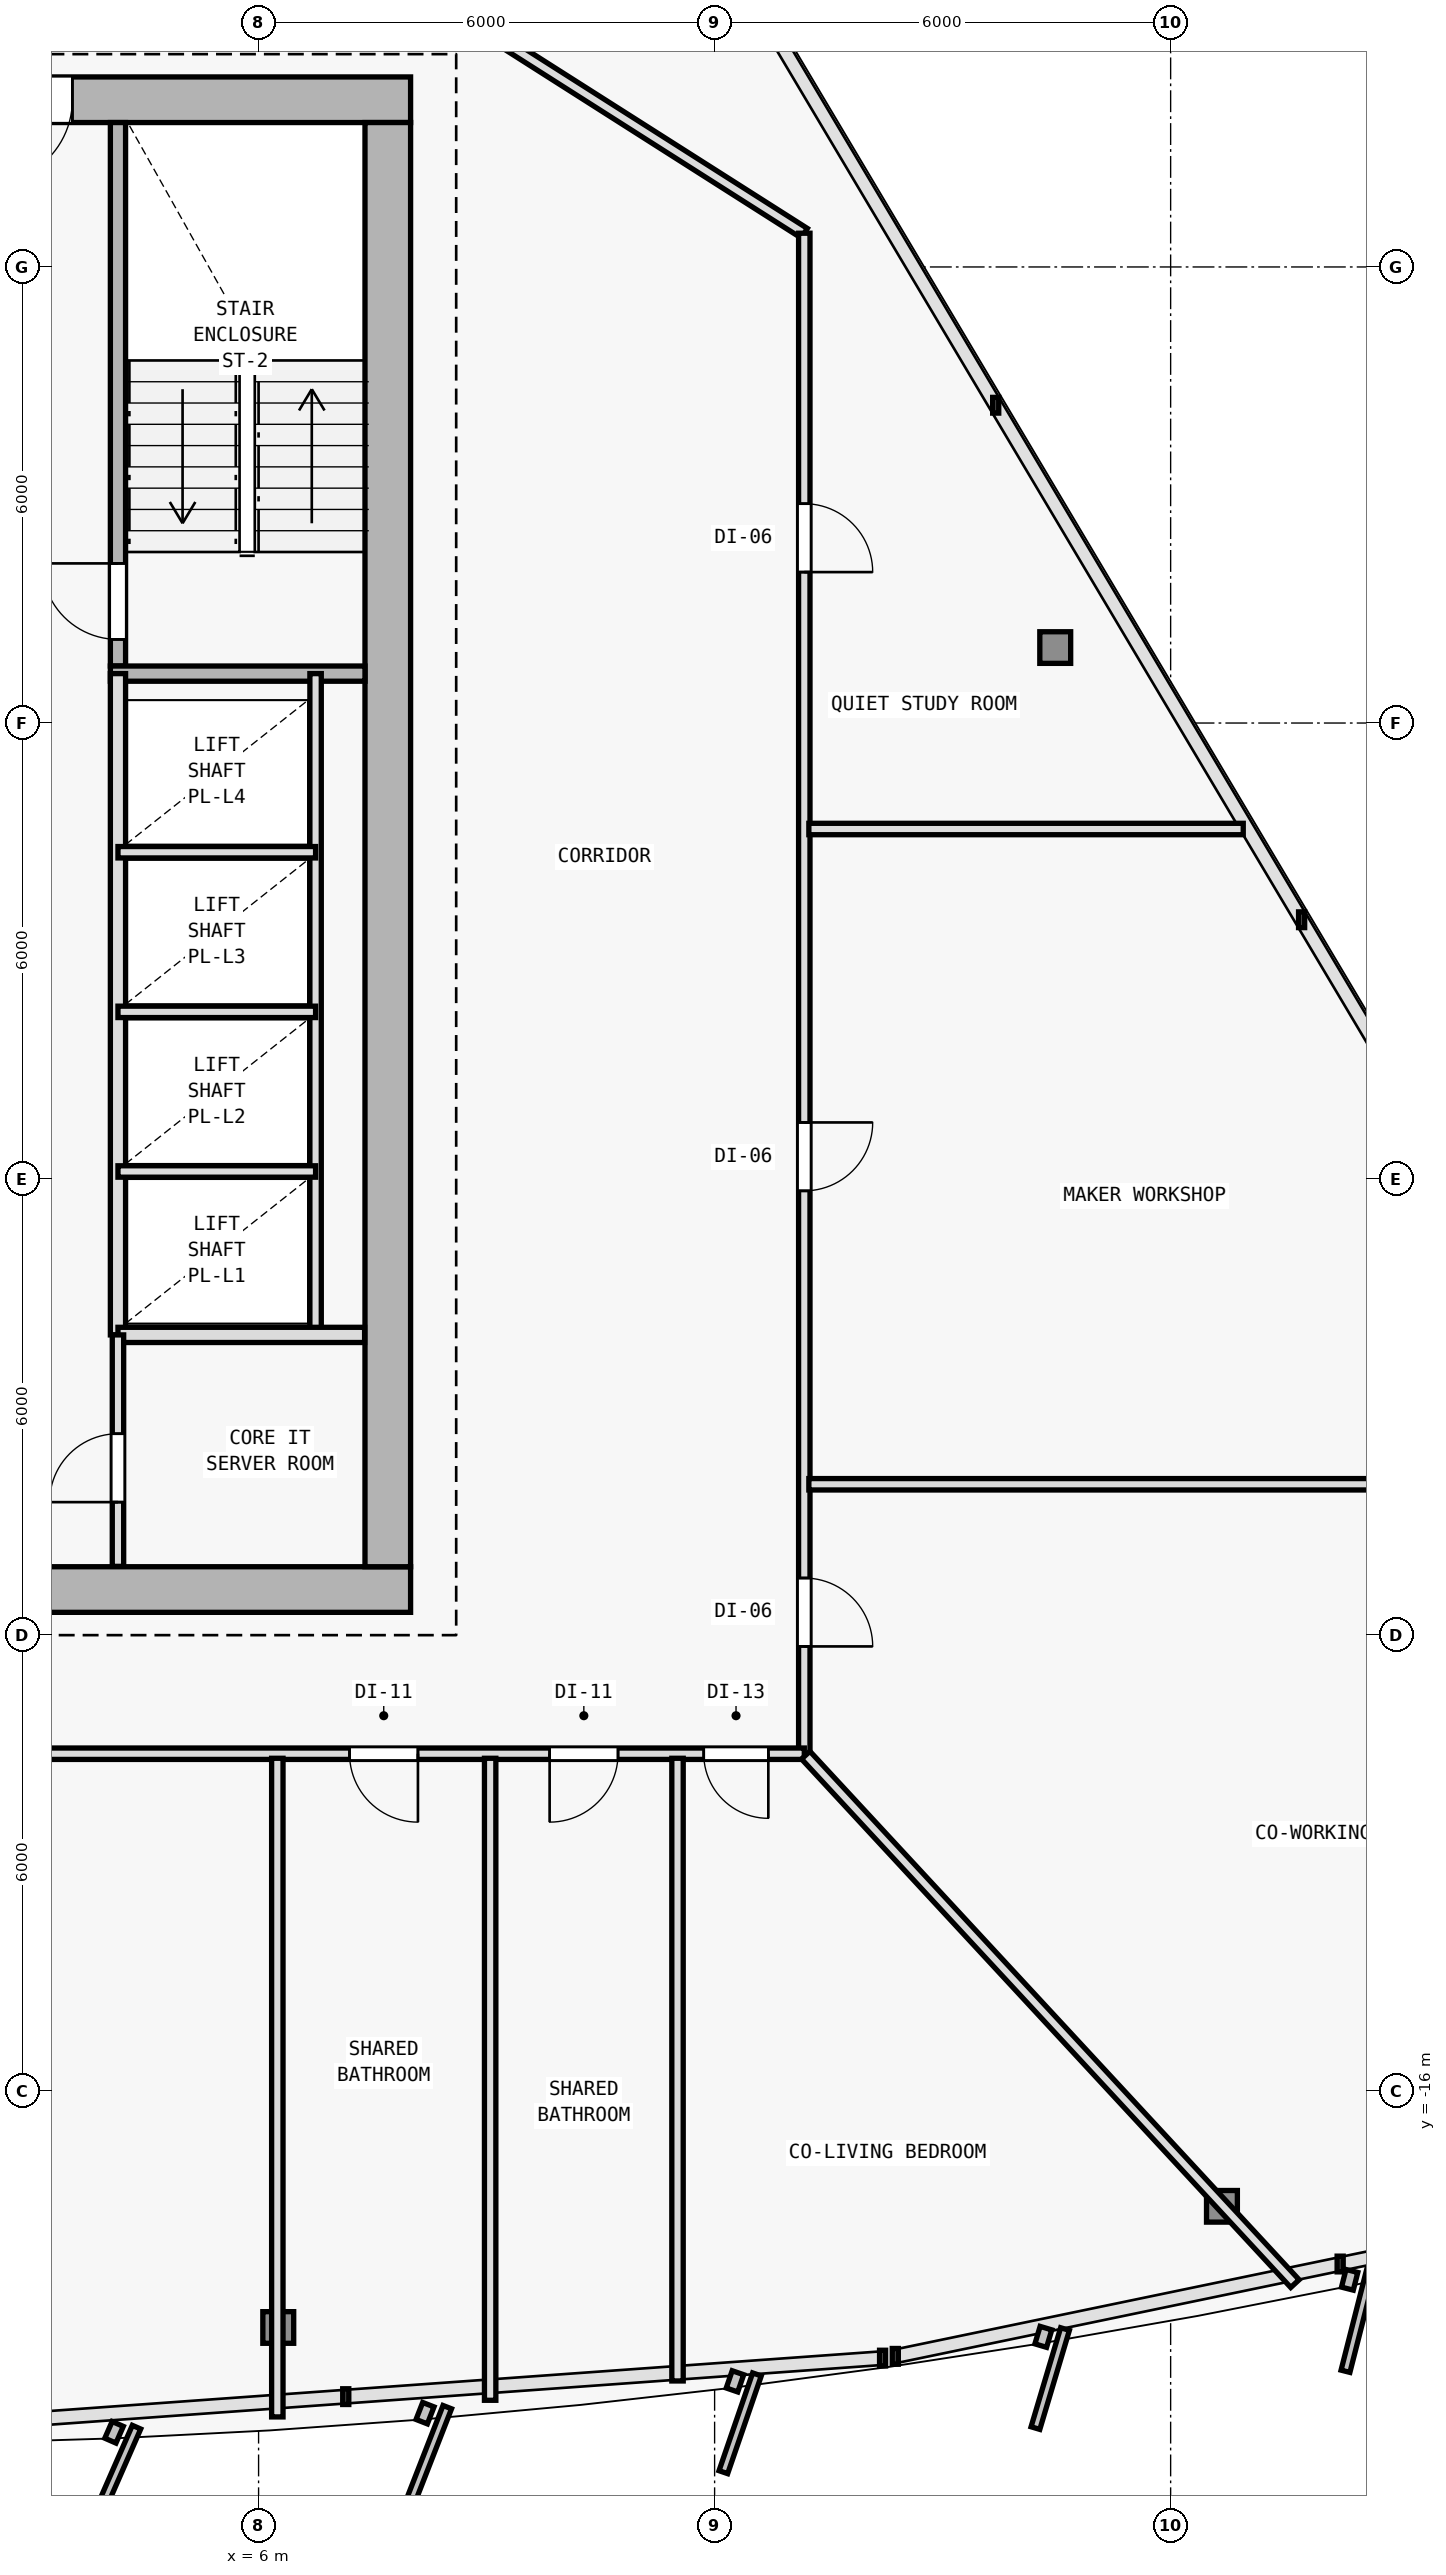
"""IFC4 building model, lengths in metres.
Left out: names, types, materials, properties, quantities, classifications, styles, units other than length and angle.
Written with IfcOpenShell. Run it as: python <this file> out.ifc"""

import sys

from ifc_helpers import new_model, si_unit, direction, frame, frame_2d, origin, origin_2d, place, context, subcontext, project, spatial, rectangle, i_section, extrude, element, fill, save


model = new_model("IFC4")
c1 = context("Model", 3, precision=1e-05, world=origin(), true_north=direction((0.0, 1.0)))
c2 = subcontext(c1, "Body", "Model", "MODEL_VIEW")
j1 = project(units=[si_unit("LENGTHUNIT", "METRE"), si_unit("PLANEANGLEUNIT", "RADIAN")], contexts=[c1])
p1 = place(None, origin())
s1 = spatial("IfcSite", under=j1, at=p1, CompositionType="ELEMENT")
p2 = place(p1, origin())
s2 = spatial("IfcBuilding", under=s1, at=p2, CompositionType="ELEMENT")
p3 = place(p2, frame((0.0, 0.0, 111.3)))
s3 = spatial("IfcBuildingStorey", under=s2, at=p3, CompositionType="ELEMENT", Elevation=111.3)
for number, where, z_axis, x_axis in (
    (1, (7.7, -9.4, 0.0), (0.0, 0.0, 1.0), (1.0, 0.0, 0.0)),
    (2, (7.7, 10.2, 0.0), (0.0, 0.0, 1.0), (1.0, 0.0, 0.0)),
    (3, (7.7, 0.4, 0.0), (0.0, 0.0, 1.0), (1.0, 0.0, 0.0)),
):
    element("IfcColumn", number, at=place(p3, frame(where, z_axis=z_axis, x_axis=x_axis)), inside=s3, PredefinedType="COLUMN", context=c2, shape_type="SweptSolid", body=[
        extrude(i_section(OverallWidth=0.409, OverallDepth=0.425, WebThickness=0.021, FlangeThickness=0.034, FilletRadius=0.015, at=origin_2d()), origin(), (0.0, 0.0, 1.0), 3.6),
    ])
p4 = place(p3, frame((6.259, -19.108, 0.005), z_axis=(-0.00693381708, 0.03528089279, 0.999353381334), x_axis=(-0.981229659911, -0.192842823335, 0.0)))
e4 = element("IfcColumn", 4, at=p4, inside=s3, PredefinedType="COLUMN", context=c2, shape_type="SweptSolid", body=[
    extrude(i_section(OverallWidth=0.406, OverallDepth=0.416, WebThickness=0.019, FlangeThickness=0.031, FilletRadius=0.015, at=origin_2d()), origin(), (0.0, 0.0, 1.0), 3.592),
])
p5 = place(p3, frame((18.675, -17.514, 0.005), z_axis=(-0.020594847032, 0.03357707734, 0.999223914922), x_axis=(-0.852427604955, -0.522845271865, 0.0)))
e5 = element("IfcColumn", 5, at=p5, inside=s3, PredefinedType="COLUMN", context=c2, shape_type="SweptSolid", body=[
    extrude(i_section(OverallWidth=0.406, OverallDepth=0.416, WebThickness=0.019, FlangeThickness=0.031, FilletRadius=0.015, at=origin_2d()), origin(), (0.0, 0.0, 1.0), 3.592),
])
p6 = place(p3, frame((16.482, 2.993, 0.005), z_axis=(-0.018906041, 0.009521027842, 0.999775930718), x_axis=(-0.449781931574, -0.893138406984, 0.0)))
e6 = element("IfcColumn", 6, at=p6, inside=s3, PredefinedType="COLUMN", context=c2, shape_type="SweptSolid", body=[
    extrude(i_section(OverallWidth=0.406, OverallDepth=0.416, WebThickness=0.019, FlangeThickness=0.031, FilletRadius=0.015, at=origin_2d()), origin(), (0.0, 0.0, 1.0), 3.59),
])
p7 = place(p3, frame((-8.0, -9.4, 0.0), z_axis=(0.0, 0.0, 1.0), x_axis=(1.0, 0.0, 0.0)))
e7 = element("IfcWall", 7, at=p7, inside=s3, PredefinedType="SHEAR", context=c2, shape_type="SweptSolid", body=[
    extrude(rectangle(XDim=16.0, YDim=0.6, at=frame_2d((8.0, 0.0))), origin(), (0.0, 0.0, 1.0), 3.35),
])
p8 = place(p7, frame((9.65, 0.0, 0.0)))
e8 = element("IfcOpeningElement", 8, at=p8, cuts=e7, PredefinedType="OPENING", context=c2, shape_type="SweptSolid", body=[
    extrude(rectangle(XDim=1.5, YDim=2.2, at=frame_2d((0.75, 1.1))), frame((0.0, 0.31, 0.0), z_axis=(0.0, -1.0, 0.0), x_axis=(1.0, 0.0, 0.0)), (0.0, 0.0, 1.0), 0.62),
])
p9 = place(p3, frame((8.0, 10.2, 0.0), z_axis=(0.0, 0.0, 1.0), x_axis=(-1.0, 0.0, 0.0)))
e9 = element("IfcWall", 9, at=p9, inside=s3, PredefinedType="SHEAR", context=c2, shape_type="SweptSolid", body=[
    extrude(rectangle(XDim=16.0, YDim=0.6, at=frame_2d((8.0, 0.0))), origin(), (0.0, 0.0, 1.0), 3.35),
])
p10 = place(p9, frame((4.45, 0.0, 0.0)))
e10 = element("IfcOpeningElement", 10, at=p10, cuts=e9, PredefinedType="OPENING", context=c2, shape_type="SweptSolid", body=[
    extrude(rectangle(XDim=1.1, YDim=2.15, at=frame_2d((0.55, 1.075))), frame((0.0, 0.31, 0.0), z_axis=(0.0, -1.0, 0.0), x_axis=(1.0, 0.0, 0.0)), (0.0, 0.0, 1.0), 0.62),
])
p11 = place(p3, frame((7.7, 9.9, 0.0), z_axis=(0.0, 0.0, 1.0), x_axis=(0.0, -1.0, 0.0)))
e11 = element("IfcWall", 11, at=p11, inside=s3, PredefinedType="SHEAR", context=c2, shape_type="SweptSolid", body=[
    extrude(rectangle(XDim=19.0, YDim=0.6, at=frame_2d((9.5, 0.0))), origin(), (0.0, 0.0, 1.0), 3.35),
])
p12 = place(p3, frame((4.15, 2.75, 0.0), z_axis=(0.0, 0.0, 1.0), x_axis=(0.0, 1.0, 0.0)))
e12 = element("IfcWall", 12, at=p12, inside=s3, PredefinedType="SOLIDWALL", context=c2, shape_type="SweptSolid", body=[
    extrude(rectangle(XDim=7.15, YDim=0.2, at=frame_2d((3.575, 0.0))), origin(), (0.0, 0.0, 1.0), 3.35),
])
p13 = place(p12, frame((0.35, 0.0, 0.0)))
e13 = element("IfcOpeningElement", 13, at=p13, cuts=e12, PredefinedType="OPENING", context=c2, shape_type="SweptSolid", body=[
    extrude(rectangle(XDim=1.0, YDim=2.15, at=frame_2d((0.5, 1.075))), frame((0.0, 0.11, 0.0), z_axis=(0.0, -1.0, 0.0), x_axis=(1.0, 0.0, 0.0)), (0.0, 0.0, 1.0), 0.22),
])
p14 = place(p3, frame((4.05, 2.65, 0.0), z_axis=(0.0, 0.0, 1.0), x_axis=(1.0, 0.0, 0.0)))
e14 = element("IfcWall", 14, at=p14, inside=s3, PredefinedType="SOLIDWALL", context=c2, shape_type="SweptSolid", body=[
    extrude(rectangle(XDim=3.35, YDim=0.2, at=frame_2d((1.675, 0.0))), origin(), (0.0, 0.0, 1.0), 3.35),
])
p15 = place(p3, frame((4.15, -6.05, 0.0), z_axis=(0.0, 0.0, 1.0), x_axis=(0.0, 1.0, 0.0)))
e15 = element("IfcWall", 15, at=p15, inside=s3, PredefinedType="SOLIDWALL", context=c2, shape_type="SweptSolid", body=[
    extrude(rectangle(XDim=8.7, YDim=0.2, at=frame_2d((4.35, 0.0))), origin(), (0.0, 0.0, 1.0), 3.35),
])
p16 = place(p3, frame((6.75, -6.05, 0.0), z_axis=(0.0, 0.0, 1.0), x_axis=(0.0, 1.0, 0.0)))
e16 = element("IfcWall", 16, at=p16, inside=s3, PredefinedType="PARTITIONING", context=c2, shape_type="SweptSolid", body=[
    extrude(rectangle(XDim=8.7, YDim=0.15, at=frame_2d((4.35, 0.0))), origin(), (0.0, 0.0, 1.0), 3.35),
])
for number, where, z_axis, x_axis in (
    (17, (4.15, -3.9, 0.0), (0.0, 0.0, 1.0), (1.0, 0.0, 0.0)),
    (18, (4.15, -1.8, 0.0), (0.0, 0.0, 1.0), (1.0, 0.0, 0.0)),
    (19, (4.15, 0.3, 0.0), (0.0, 0.0, 1.0), (1.0, 0.0, 0.0)),
):
    element("IfcWall", number, at=place(p3, frame(where, z_axis=z_axis, x_axis=x_axis)), inside=s3, PredefinedType="PARTITIONING", context=c2, shape_type="SweptSolid", body=[
        extrude(rectangle(XDim=2.6, YDim=0.15, at=frame_2d((1.3, 0.0))), origin(), (0.0, 0.0, 1.0), 3.35),
    ])
p17 = place(p3, frame((4.15, -6.05, 0.0), z_axis=(0.0, 0.0, 1.0), x_axis=(1.0, 0.0, 0.0)))
e20 = element("IfcWall", 20, at=p17, inside=s3, PredefinedType="SOLIDWALL", context=c2, shape_type="SweptSolid", body=[
    extrude(rectangle(XDim=3.245, YDim=0.2, at=frame_2d((1.623, 0.0))), origin(), (0.0, 0.0, 1.0), 3.35),
])
p18 = place(p3, frame((4.15, -9.095, 0.0), z_axis=(0.0, 0.0, 1.0), x_axis=(0.0, 1.0, 0.0)))
e21 = element("IfcWall", 21, at=p18, inside=s3, PredefinedType="PARTITIONING", context=c2, shape_type="SweptSolid", body=[
    extrude(rectangle(XDim=3.045, YDim=0.15, at=frame_2d((1.522, 0.0))), origin(), (0.0, 0.0, 1.0), 3.35),
])
p19 = place(p18, frame((0.845, 0.0, 0.0)))
e22 = element("IfcOpeningElement", 22, at=p19, cuts=e21, PredefinedType="OPENING", context=c2, shape_type="SweptSolid", body=[
    extrude(rectangle(XDim=0.9, YDim=2.1, at=frame_2d((0.45, 1.05))), frame((0.0, 0.085, 0.0), z_axis=(0.0, -1.0, 0.0), x_axis=(1.0, 0.0, 0.0)), (0.0, 0.0, 1.0), 0.17),
])
p20 = place(p3, frame((7.023, 12.36, 0.0), z_axis=(0.0, 0.0, 1.0), x_axis=(0.84376480085, -0.536713108511, 0.0)))
e23 = element("IfcWall", 23, at=p20, inside=s3, PredefinedType="PARTITIONING", context=c2, shape_type="SweptSolid", body=[
    extrude(rectangle(XDim=7.297, YDim=0.15, at=frame_2d((3.648, 0.0))), origin(), (0.0, 0.0, 1.0), 2.725),
])
p21 = place(p3, frame((13.18, 8.444, 0.0), z_axis=(0.0, 0.0, 1.0), x_axis=(0.0, -1.0, 0.0)))
e24 = element("IfcWall", 24, at=p21, inside=s3, PredefinedType="PARTITIONING", context=c2, shape_type="SweptSolid", body=[
    extrude(rectangle(XDim=20.004, YDim=0.15, at=frame_2d((10.002, 0.0))), origin(), (0.0, 0.0, 1.0), 2.705),
])
p22 = place(p21, frame((17.692, 0.0, 0.0)))
e25 = element("IfcOpeningElement", 25, at=p22, cuts=e24, PredefinedType="OPENING", context=c2, shape_type="SweptSolid", body=[
    extrude(rectangle(XDim=0.9, YDim=2.1, at=frame_2d((0.45, 1.05))), frame((0.0, 0.085, 0.0), z_axis=(0.0, -1.0, 0.0), x_axis=(1.0, 0.0, 0.0)), (0.0, 0.0, 1.0), 0.17),
])
p23 = place(p21, frame((11.699, 0.0, 0.0)))
e26 = element("IfcOpeningElement", 26, at=p23, cuts=e24, PredefinedType="OPENING", context=c2, shape_type="SweptSolid", body=[
    extrude(rectangle(XDim=0.9, YDim=2.1, at=frame_2d((0.45, 1.05))), frame((0.0, 0.085, 0.0), z_axis=(0.0, -1.0, 0.0), x_axis=(1.0, 0.0, 0.0)), (0.0, 0.0, 1.0), 0.17),
])
p24 = place(p21, frame((3.558, 0.0, 0.0)))
e27 = element("IfcOpeningElement", 27, at=p24, cuts=e24, PredefinedType="OPENING", context=c2, shape_type="SweptSolid", body=[
    extrude(rectangle(XDim=0.9, YDim=2.1, at=frame_2d((0.45, 1.05))), frame((0.0, 0.085, 0.0), z_axis=(0.0, -1.0, 0.0), x_axis=(1.0, 0.0, 0.0)), (0.0, 0.0, 1.0), 0.17),
])
p25 = place(p3, frame((13.18, -11.56, 0.0), z_axis=(0.0, 0.0, 1.0), x_axis=(-1.0, 0.0, 0.0)))
e28 = element("IfcWall", 28, at=p25, inside=s3, PredefinedType="PARTITIONING", context=c2, shape_type="SweptSolid", body=[
    extrude(rectangle(XDim=23.04, YDim=0.15, at=frame_2d((11.52, 0.0))), origin(), (0.0, 0.0, 1.0), 2.775),
])
p26 = place(p25, frame((14.448, 0.0, 0.0)))
e29 = element("IfcOpeningElement", 29, at=p26, cuts=e28, PredefinedType="OPENING", context=c2, shape_type="SweptSolid", body=[
    extrude(rectangle(XDim=0.9, YDim=2.1, at=frame_2d((0.45, 1.05))), frame((0.0, 0.085, 0.0), z_axis=(0.0, -1.0, 0.0), x_axis=(1.0, 0.0, 0.0)), (0.0, 0.0, 1.0), 0.17),
])
p27 = place(p25, frame((5.083, 0.0, 0.0)))
e30 = element("IfcOpeningElement", 30, at=p27, cuts=e28, PredefinedType="OPENING", context=c2, shape_type="SweptSolid", body=[
    extrude(rectangle(XDim=0.9, YDim=2.1, at=frame_2d((0.45, 1.05))), frame((0.0, 0.085, 0.0), z_axis=(0.0, -1.0, 0.0), x_axis=(1.0, 0.0, 0.0)), (0.0, 0.0, 1.0), 0.17),
])
p28 = place(p25, frame((2.451, 0.0, 0.0)))
e31 = element("IfcOpeningElement", 31, at=p28, cuts=e28, PredefinedType="OPENING", context=c2, shape_type="SweptSolid", body=[
    extrude(rectangle(XDim=0.9, YDim=2.1, at=frame_2d((0.45, 1.05))), frame((0.0, 0.085, 0.0), z_axis=(0.0, -1.0, 0.0), x_axis=(1.0, 0.0, 0.0)), (0.0, 0.0, 1.0), 0.17),
])
p29 = place(p25, frame((0.473, 0.0, 0.0)))
e32 = element("IfcOpeningElement", 32, at=p29, cuts=e28, PredefinedType="OPENING", context=c2, shape_type="SweptSolid", body=[
    extrude(rectangle(XDim=0.85, YDim=2.1, at=frame_2d((0.425, 1.05))), frame((0.0, 0.085, 0.0), z_axis=(0.0, -1.0, 0.0), x_axis=(1.0, 0.0, 0.0)), (0.0, 0.0, 1.0), 0.17),
])
p30 = place(p3, frame((6.247, -11.62, 0.0), z_axis=(0.0, 0.0, 1.0), x_axis=(0.0, -1.0, 0.0)))
e33 = element("IfcWall", 33, at=p30, inside=s3, PredefinedType="PARTITIONING", context=c2, shape_type="SweptSolid", body=[
    extrude(rectangle(XDim=8.665, YDim=0.15, at=frame_2d((4.333, 0.0))), origin(), (0.0, 0.0, 1.0), 2.775),
])
p31 = place(p3, frame((13.199, -11.579, 0.0), z_axis=(0.0, 0.0, 1.0), x_axis=(0.679358186911, -0.733806823269, 0.0)))
e34 = element("IfcWall", 34, at=p31, inside=s3, PredefinedType="PARTITIONING", context=c2, shape_type="SweptSolid", body=[
    extrude(rectangle(XDim=9.474, YDim=0.15, at=frame_2d((4.737, 0.0))), origin(), (0.0, 0.0, 1.0), 2.775),
])
p32 = place(p3, frame((13.24, -8.015, 0.0), z_axis=(0.0, 0.0, 1.0), x_axis=(1.0, 0.0, 0.0)))
e35 = element("IfcWall", 35, at=p32, inside=s3, PredefinedType="PARTITIONING", context=c2, shape_type="SweptSolid", body=[
    extrude(rectangle(XDim=10.841, YDim=0.15, at=frame_2d((5.421, 0.0))), origin(), (0.0, 0.0, 1.0), 2.705),
])
p33 = place(p3, frame((11.512, -11.62, 0.0), z_axis=(0.0, 0.0, 1.0), x_axis=(0.0, -1.0, 0.0)))
e36 = element("IfcWall", 36, at=p33, inside=s3, PredefinedType="PARTITIONING", context=c2, shape_type="SweptSolid", body=[
    extrude(rectangle(XDim=8.192, YDim=0.15, at=frame_2d((4.096, 0.0))), origin(), (0.0, 0.0, 1.0), 2.775),
])
p34 = place(p3, frame((9.047, -11.62, 0.0), z_axis=(0.0, 0.0, 1.0), x_axis=(0.0, -1.0, 0.0)))
e37 = element("IfcWall", 37, at=p34, inside=s3, PredefinedType="PARTITIONING", context=c2, shape_type="SweptSolid", body=[
    extrude(rectangle(XDim=8.446, YDim=0.15, at=frame_2d((4.223, 0.0))), origin(), (0.0, 0.0, 1.0), 2.835),
])
p35 = place(p3, frame((13.24, 0.606, 0.0), z_axis=(0.0, 0.0, 1.0), x_axis=(1.0, 0.0, 0.0)))
e38 = element("IfcWall", 38, at=p35, inside=s3, PredefinedType="PARTITIONING", context=c2, shape_type="SweptSolid", body=[
    extrude(rectangle(XDim=5.715, YDim=0.15, at=frame_2d((2.858, 0.0))), origin(), (0.0, 0.0, 1.0), 2.835),
])
p36 = place(p10, origin())
e39 = element("IfcDoor", 39, at=p36, inside=s3, OperationType="SINGLE_SWING_RIGHT", PredefinedType="DOOR", context=c2, shape_type="SweptSolid", body=[
    extrude(rectangle(XDim=1.1, YDim=2.15, at=frame_2d((0.55, 1.075))), frame((0.0, 0.025, 0.0), z_axis=(0.0, -1.0, 0.0), x_axis=(1.0, 0.0, 0.0)), (0.0, 0.0, 1.0), 0.05),
])
fill(e10, e39)
p37 = place(p13, origin())
e40 = element("IfcDoor", 40, at=p37, inside=s3, OperationType="SINGLE_SWING_RIGHT", PredefinedType="DOOR", context=c2, shape_type="SweptSolid", body=[
    extrude(rectangle(XDim=1.0, YDim=2.15, at=frame_2d((0.5, 1.075))), frame((0.0, 0.025, 0.0), z_axis=(0.0, -1.0, 0.0), x_axis=(1.0, 0.0, 0.0)), (0.0, 0.0, 1.0), 0.05),
])
fill(e13, e40)
p38 = place(p19, origin())
e41 = element("IfcDoor", 41, at=p38, inside=s3, OperationType="SINGLE_SWING_LEFT", PredefinedType="DOOR", context=c2, shape_type="SweptSolid", body=[
    extrude(rectangle(XDim=0.9, YDim=2.1, at=frame_2d((0.45, 1.05))), frame((0.0, 0.025, 0.0), z_axis=(0.0, -1.0, 0.0), x_axis=(1.0, 0.0, 0.0)), (0.0, 0.0, 1.0), 0.05),
])
fill(e22, e41)
p39 = place(p27, origin())
e42 = element("IfcDoor", 42, at=p39, inside=s3, OperationType="SINGLE_SWING_LEFT", PredefinedType="DOOR", context=c2, shape_type="SweptSolid", body=[
    extrude(rectangle(XDim=0.9, YDim=2.1, at=frame_2d((0.45, 1.05))), frame((0.0, 0.025, 0.0), z_axis=(0.0, -1.0, 0.0), x_axis=(1.0, 0.0, 0.0)), (0.0, 0.0, 1.0), 0.05),
])
fill(e30, e42)
p40 = place(p28, origin())
e43 = element("IfcDoor", 43, at=p40, inside=s3, OperationType="SINGLE_SWING_RIGHT", PredefinedType="DOOR", context=c2, shape_type="SweptSolid", body=[
    extrude(rectangle(XDim=0.9, YDim=2.1, at=frame_2d((0.45, 1.05))), frame((0.0, 0.025, 0.0), z_axis=(0.0, -1.0, 0.0), x_axis=(1.0, 0.0, 0.0)), (0.0, 0.0, 1.0), 0.05),
])
fill(e31, e43)
p41 = place(p29, origin())
e44 = element("IfcDoor", 44, at=p41, inside=s3, OperationType="SINGLE_SWING_LEFT", PredefinedType="DOOR", context=c2, shape_type="SweptSolid", body=[
    extrude(rectangle(XDim=0.85, YDim=2.1, at=frame_2d((0.425, 1.05))), frame((0.0, 0.025, 0.0), z_axis=(0.0, -1.0, 0.0), x_axis=(1.0, 0.0, 0.0)), (0.0, 0.0, 1.0), 0.05),
])
fill(e32, e44)
p42 = place(p22, origin())
e45 = element("IfcDoor", 45, at=p42, inside=s3, OperationType="SINGLE_SWING_RIGHT", PredefinedType="DOOR", context=c2, shape_type="SweptSolid", body=[
    extrude(rectangle(XDim=0.9, YDim=2.1, at=frame_2d((0.45, 1.05))), frame((0.0, 0.025, 0.0), z_axis=(0.0, -1.0, 0.0), x_axis=(1.0, 0.0, 0.0)), (0.0, 0.0, 1.0), 0.05),
])
fill(e25, e45)
p43 = place(p23, origin())
e46 = element("IfcDoor", 46, at=p43, inside=s3, OperationType="SINGLE_SWING_LEFT", PredefinedType="DOOR", context=c2, shape_type="SweptSolid", body=[
    extrude(rectangle(XDim=0.9, YDim=2.1, at=frame_2d((0.45, 1.05))), frame((0.0, 0.025, 0.0), z_axis=(0.0, -1.0, 0.0), x_axis=(1.0, 0.0, 0.0)), (0.0, 0.0, 1.0), 0.05),
])
fill(e26, e46)
p44 = place(p24, origin())
e47 = element("IfcDoor", 47, at=p44, inside=s3, OperationType="SINGLE_SWING_RIGHT", PredefinedType="DOOR", context=c2, shape_type="SweptSolid", body=[
    extrude(rectangle(XDim=0.9, YDim=2.1, at=frame_2d((0.45, 1.05))), frame((0.0, 0.025, 0.0), z_axis=(0.0, -1.0, 0.0), x_axis=(1.0, 0.0, 0.0)), (0.0, 0.0, 1.0), 0.05),
])
fill(e27, e47)
save(model, sys.argv[1])
